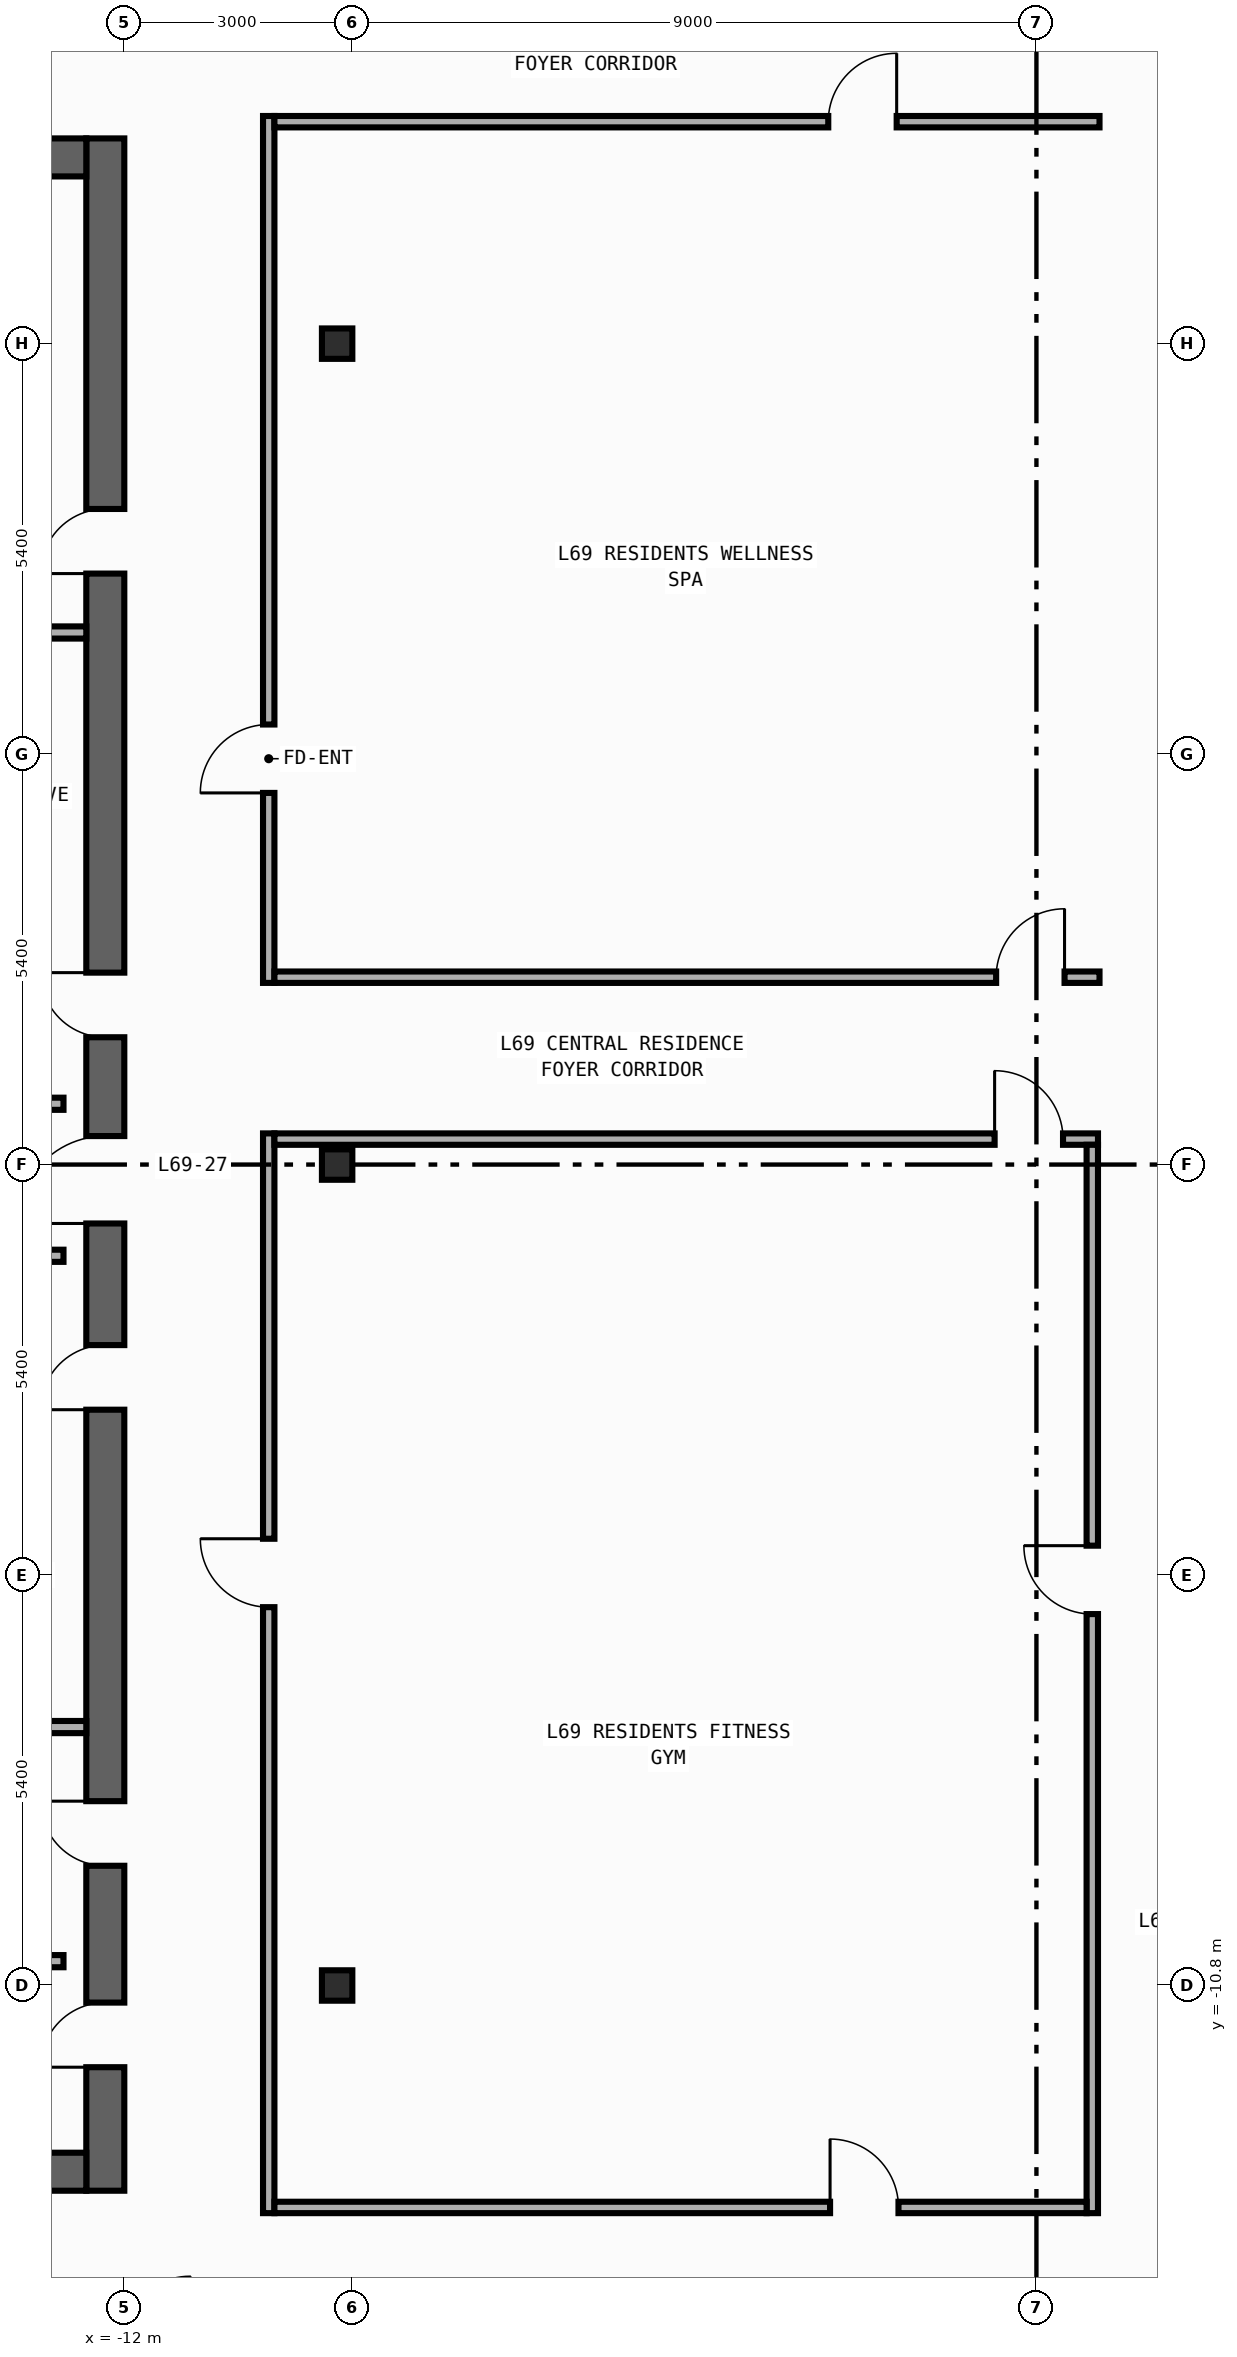
"""IFC4 building model, lengths in metres.
Left out: names, types, materials, properties, quantities, classifications, styles, units other than length and angle.
Written with IfcOpenShell. Run it as: python <this file> out.ifc"""

import sys

from ifc_helpers import new_model, si_unit, direction, frame, frame_2d, origin, origin_2d, place, context, subcontext, project, spatial, rectangle, i_section, extrude, element, fill, save


model = new_model("IFC4")
c1 = context("Model", 3, precision=1e-05, world=origin(), true_north=direction((0.0, 1.0)))
c2 = subcontext(c1, "Body", "Model", "MODEL_VIEW")
j1 = project(units=[si_unit("LENGTHUNIT", "METRE"), si_unit("PLANEANGLEUNIT", "RADIAN")], contexts=[c1])
p1 = place(None, origin())
s1 = spatial("IfcSite", under=j1, at=p1, CompositionType="ELEMENT")
p2 = place(p1, origin())
s2 = spatial("IfcBuilding", under=s1, at=p2, CompositionType="ELEMENT")
p3 = place(p2, frame((0.0, 0.0, 289.0)))
s3 = spatial("IfcBuildingStorey", under=s2, at=p3, CompositionType="ELEMENT", Elevation=289.0)
p4 = place(p3, frame((-12.25, -13.5, 0.0), z_axis=(0.0, 0.0, 1.0), x_axis=(0.0, 1.0, 0.0)))
e1 = element("IfcWall", 1, at=p4, inside=s3, PredefinedType="SHEAR", context=c2, shape_type="SweptSolid", body=[
    extrude(rectangle(XDim=27.0, YDim=0.5, at=frame_2d((13.5, 0.0))), origin(), (0.0, 0.0, 1.0), 3.54),
])
p5 = place(p4, frame((15.175, 0.0, 0.0)))
e2 = element("IfcOpeningElement", 2, at=p5, cuts=e1, PredefinedType="OPENING", context=c2, shape_type="SweptSolid", body=[
    extrude(rectangle(XDim=0.85, YDim=2.1, at=frame_2d((0.425, 1.05))), frame((0.0, 0.26, 0.0), z_axis=(0.0, -1.0, 0.0), x_axis=(1.0, 0.0, 0.0)), (0.0, 0.0, 1.0), 0.52),
])
p6 = place(p4, frame((21.275, 0.0, 0.0)))
e3 = element("IfcOpeningElement", 3, at=p6, cuts=e1, PredefinedType="OPENING", context=c2, shape_type="SweptSolid", body=[
    extrude(rectangle(XDim=0.85, YDim=2.1, at=frame_2d((0.425, 1.05))), frame((0.0, 0.26, 0.0), z_axis=(0.0, -1.0, 0.0), x_axis=(1.0, 0.0, 0.0)), (0.0, 0.0, 1.0), 0.52),
])
p7 = place(p4, frame((4.275, 0.0, 0.0)))
e4 = element("IfcOpeningElement", 4, at=p7, cuts=e1, PredefinedType="OPENING", context=c2, shape_type="SweptSolid", body=[
    extrude(rectangle(XDim=0.85, YDim=2.1, at=frame_2d((0.425, 1.05))), frame((0.0, 0.26, 0.0), z_axis=(0.0, -1.0, 0.0), x_axis=(1.0, 0.0, 0.0)), (0.0, 0.0, 1.0), 0.52),
])
p8 = place(p4, frame((10.275, 0.0, 0.0)))
e5 = element("IfcOpeningElement", 5, at=p8, cuts=e1, PredefinedType="OPENING", context=c2, shape_type="SweptSolid", body=[
    extrude(rectangle(XDim=0.85, YDim=2.1, at=frame_2d((0.425, 1.05))), frame((0.0, 0.26, 0.0), z_axis=(0.0, -1.0, 0.0), x_axis=(1.0, 0.0, 0.0)), (0.0, 0.0, 1.0), 0.52),
])
p9 = place(p4, frame((12.725, 0.0, 0.0)))
e6 = element("IfcOpeningElement", 6, at=p9, cuts=e1, PredefinedType="OPENING", context=c2, shape_type="SweptSolid", body=[
    extrude(rectangle(XDim=1.15, YDim=2.2, at=frame_2d((0.575, 1.1))), frame((0.0, 0.26, 0.0), z_axis=(0.0, -1.0, 0.0), x_axis=(1.0, 0.0, 0.0)), (0.0, 0.0, 1.0), 0.52),
])
p10 = place(p4, frame((1.625, 0.0, 0.0)))
e7 = element("IfcOpeningElement", 7, at=p10, cuts=e1, PredefinedType="OPENING", context=c2, shape_type="SweptSolid", body=[
    extrude(rectangle(XDim=0.85, YDim=2.1, at=frame_2d((0.425, 1.05))), frame((0.0, 0.26, 0.0), z_axis=(0.0, -1.0, 0.0), x_axis=(1.0, 0.0, 0.0)), (0.0, 0.0, 1.0), 0.52),
])
for number, where, z_axis, x_axis in (
    (8, (-19.9, -13.25, 0.0), (0.0, 0.0, 1.0), (1.0, 0.0, 0.0)),
    (9, (-19.9, 13.25, 0.0), (0.0, 0.0, 1.0), (1.0, 0.0, 0.0)),
):
    element("IfcWall", number, at=place(p3, frame(where, z_axis=z_axis, x_axis=x_axis)), inside=s3, PredefinedType="SHEAR", context=c2, shape_type="SweptSolid", body=[
        extrude(rectangle(XDim=7.4, YDim=0.5, at=frame_2d((3.7, 0.0))), origin(), (0.0, 0.0, 1.0), 3.54),
    ])
for number, where, z_axis, x_axis in (
    (10, (-9.2, -10.8, 0.0), (0.0, 0.0, 1.0), (1.0, 0.0, 0.0)),
    (11, (-9.2, 0.0, 0.0), (0.0, 0.0, 1.0), (1.0, 0.0, 0.0)),
    (12, (-9.2, 10.8, 0.0), (0.0, 0.0, 1.0), (1.0, 0.0, 0.0)),
):
    element("IfcColumn", number, at=place(p3, frame(where, z_axis=z_axis, x_axis=x_axis)), inside=s3, PredefinedType="COLUMN", context=c2, shape_type="SweptSolid", body=[
        extrude(i_section(OverallWidth=0.4, OverallDepth=0.4, WebThickness=0.013, FlangeThickness=0.021, FilletRadius=0.022, at=origin_2d()), origin(), (0.0, 0.0, 1.0), 3.8),
    ])
for number, where, z_axis, x_axis in (
    (13, (-15.4, 0.8, 0.0), (0.0, 0.0, 1.0), (1.0, 0.0, 0.0)),
    (14, (-15.4, -1.2, 0.0), (0.0, 0.0, 1.0), (1.0, 0.0, 0.0)),
    (15, (-15.4, -10.48, 0.0), (0.0, 0.0, 1.0), (1.0, 0.0, 0.0)),
):
    element("IfcWall", number, at=place(p3, frame(where, z_axis=z_axis, x_axis=x_axis)), inside=s3, PredefinedType="STANDARD", context=c2, shape_type="SweptSolid", body=[
        extrude(rectangle(XDim=2.6, YDim=0.16, at=frame_2d((1.3, 0.0))), origin(), (0.0, 0.0, 1.0), 3.54),
    ])
for number, where, z_axis, x_axis in (
    (16, (-15.4, 7.0, 0.0), (0.0, 0.0, 1.0), (1.0, 0.0, 0.0)),
    (17, (-15.4, -7.4, 0.0), (0.0, 0.0, 1.0), (1.0, 0.0, 0.0)),
):
    element("IfcWall", number, at=place(p3, frame(where, z_axis=z_axis, x_axis=x_axis)), inside=s3, PredefinedType="PARTITIONING", context=c2, shape_type="SweptSolid", body=[
        extrude(rectangle(XDim=2.9, YDim=0.16, at=frame_2d((1.45, 0.0))), origin(), (0.0, 0.0, 1.0), 3.54),
    ])
p11 = place(p3, frame((-10.1, 2.39, 0.0), z_axis=(0.0, 0.0, 1.0), x_axis=(0.0, 1.0, 0.0)))
e18 = element("IfcWall", 18, at=p11, inside=s3, PredefinedType="PARTITIONING", context=c2, shape_type="SweptSolid", body=[
    extrude(rectangle(XDim=11.405, YDim=0.15, at=frame_2d((5.703, 0.0))), origin(), (0.0, 0.0, 1.0), 3.54),
])
p12 = place(p11, frame((2.5, 0.0, 0.0)))
e19 = element("IfcOpeningElement", 19, at=p12, cuts=e18, PredefinedType="OPENING", context=c2, shape_type="SweptSolid", body=[
    extrude(rectangle(XDim=0.9, YDim=2.15, at=frame_2d((0.45, 1.075))), frame((0.0, 0.085, 0.0), z_axis=(0.0, -1.0, 0.0), x_axis=(1.0, 0.0, 0.0)), (0.0, 0.0, 1.0), 0.17),
])
p13 = place(p3, frame((-10.1, -13.795, 0.0), z_axis=(0.0, 0.0, 1.0), x_axis=(0.0, 1.0, 0.0)))
e20 = element("IfcWall", 20, at=p13, inside=s3, PredefinedType="PARTITIONING", context=c2, shape_type="SweptSolid", body=[
    extrude(rectangle(XDim=14.205, YDim=0.15, at=frame_2d((7.103, 0.0))), origin(), (0.0, 0.0, 1.0), 3.54),
])
p14 = place(p13, frame((7.972, 0.0, 0.0)))
e21 = element("IfcOpeningElement", 21, at=p14, cuts=e20, PredefinedType="OPENING", context=c2, shape_type="SweptSolid", body=[
    extrude(rectangle(XDim=0.9, YDim=2.15, at=frame_2d((0.45, 1.075))), frame((0.0, 0.085, 0.0), z_axis=(0.0, -1.0, 0.0), x_axis=(1.0, 0.0, 0.0)), (0.0, 0.0, 1.0), 0.17),
])
p15 = place(p3, frame((-10.025, 2.465, 0.0), z_axis=(0.0, 0.0, 1.0), x_axis=(1.0, 0.0, 0.0)))
e22 = element("IfcWall", 22, at=p15, inside=s3, PredefinedType="PARTITIONING", context=c2, shape_type="SweptSolid", body=[
    extrude(rectangle(XDim=10.855, YDim=0.15, at=frame_2d((5.427, 0.0))), origin(), (0.0, 0.0, 1.0), 3.54),
])
p16 = place(p15, frame((9.495, 0.0, 0.0)))
e23 = element("IfcOpeningElement", 23, at=p16, cuts=e22, PredefinedType="OPENING", context=c2, shape_type="SweptSolid", body=[
    extrude(rectangle(XDim=0.9, YDim=2.15, at=frame_2d((0.45, 1.075))), frame((0.0, 0.085, 0.0), z_axis=(0.0, -1.0, 0.0), x_axis=(1.0, 0.0, 0.0)), (0.0, 0.0, 1.0), 0.17),
])
p17 = place(p3, frame((-10.025, 0.335, 0.0), z_axis=(0.0, 0.0, 1.0), x_axis=(1.0, 0.0, 0.0)))
e24 = element("IfcWall", 24, at=p17, inside=s3, PredefinedType="PARTITIONING", context=c2, shape_type="SweptSolid", body=[
    extrude(rectangle(XDim=10.835, YDim=0.15, at=frame_2d((5.417, 0.0))), origin(), (0.0, 0.0, 1.0), 2.64),
])
p18 = place(p17, frame((9.475, 0.0, 0.0)))
e25 = element("IfcOpeningElement", 25, at=p18, cuts=e24, PredefinedType="OPENING", context=c2, shape_type="SweptSolid", body=[
    extrude(rectangle(XDim=0.9, YDim=2.15, at=frame_2d((0.45, 1.075))), frame((0.0, 0.085, 0.0), z_axis=(0.0, -1.0, 0.0), x_axis=(1.0, 0.0, 0.0)), (0.0, 0.0, 1.0), 0.17),
])
p19 = place(p3, frame((0.735, -13.795, 0.0), z_axis=(0.0, 0.0, 1.0), x_axis=(0.0, 1.0, 0.0)))
e26 = element("IfcWall", 26, at=p19, inside=s3, PredefinedType="PARTITIONING", context=c2, shape_type="SweptSolid", body=[
    extrude(rectangle(XDim=14.055, YDim=0.15, at=frame_2d((7.027, 0.0))), origin(), (0.0, 0.0, 1.0), 3.54),
])
p20 = place(p19, frame((7.881, 0.0, 0.0)))
e27 = element("IfcOpeningElement", 27, at=p20, cuts=e26, PredefinedType="OPENING", context=c2, shape_type="SweptSolid", body=[
    extrude(rectangle(XDim=0.9, YDim=2.15, at=frame_2d((0.45, 1.075))), frame((0.0, 0.085, 0.0), z_axis=(0.0, -1.0, 0.0), x_axis=(1.0, 0.0, 0.0)), (0.0, 0.0, 1.0), 0.17),
])
p21 = place(p3, frame((-10.025, 13.72, 0.0), z_axis=(0.0, 0.0, 1.0), x_axis=(1.0, 0.0, 0.0)))
e28 = element("IfcWall", 28, at=p21, inside=s3, PredefinedType="PARTITIONING", context=c2, shape_type="SweptSolid", body=[
    extrude(rectangle(XDim=10.855, YDim=0.15, at=frame_2d((5.427, 0.0))), origin(), (0.0, 0.0, 1.0), 3.54),
])
p22 = place(p21, frame((7.286, 0.0, 0.0)))
e29 = element("IfcOpeningElement", 29, at=p22, cuts=e28, PredefinedType="OPENING", context=c2, shape_type="SweptSolid", body=[
    extrude(rectangle(XDim=0.9, YDim=2.15, at=frame_2d((0.45, 1.075))), frame((0.0, 0.085, 0.0), z_axis=(0.0, -1.0, 0.0), x_axis=(1.0, 0.0, 0.0)), (0.0, 0.0, 1.0), 0.17),
])
p23 = place(p3, frame((-10.025, -13.72, 0.0), z_axis=(0.0, 0.0, 1.0), x_axis=(1.0, 0.0, 0.0)))
e30 = element("IfcWall", 30, at=p23, inside=s3, PredefinedType="PARTITIONING", context=c2, shape_type="SweptSolid", body=[
    extrude(rectangle(XDim=10.685, YDim=0.15, at=frame_2d((5.342, 0.0))), origin(), (0.0, 0.0, 1.0), 3.54),
])
p24 = place(p23, frame((7.31, 0.0, 0.0)))
e31 = element("IfcOpeningElement", 31, at=p24, cuts=e30, PredefinedType="OPENING", context=c2, shape_type="SweptSolid", body=[
    extrude(rectangle(XDim=0.9, YDim=2.15, at=frame_2d((0.45, 1.075))), frame((0.0, 0.085, 0.0), z_axis=(0.0, -1.0, 0.0), x_axis=(1.0, 0.0, 0.0)), (0.0, 0.0, 1.0), 0.17),
])
p25 = place(p5, origin())
e32 = element("IfcDoor", 32, at=p25, inside=s3, OperationType="SINGLE_SWING_RIGHT", PredefinedType="DOOR", context=c2, shape_type="SweptSolid", body=[
    extrude(rectangle(XDim=0.85, YDim=2.1, at=frame_2d((0.425, 1.05))), frame((0.0, 0.025, 0.0), z_axis=(0.0, -1.0, 0.0), x_axis=(1.0, 0.0, 0.0)), (0.0, 0.0, 1.0), 0.05),
])
fill(e2, e32)
p26 = place(p6, origin())
e33 = element("IfcDoor", 33, at=p26, inside=s3, OperationType="SINGLE_SWING_LEFT", PredefinedType="DOOR", context=c2, shape_type="SweptSolid", body=[
    extrude(rectangle(XDim=0.85, YDim=2.1, at=frame_2d((0.425, 1.05))), frame((0.0, 0.025, 0.0), z_axis=(0.0, -1.0, 0.0), x_axis=(1.0, 0.0, 0.0)), (0.0, 0.0, 1.0), 0.05),
])
fill(e3, e33)
p27 = place(p7, origin())
e34 = element("IfcDoor", 34, at=p27, inside=s3, OperationType="SINGLE_SWING_RIGHT", PredefinedType="DOOR", context=c2, shape_type="SweptSolid", body=[
    extrude(rectangle(XDim=0.85, YDim=2.1, at=frame_2d((0.425, 1.05))), frame((0.0, 0.025, 0.0), z_axis=(0.0, -1.0, 0.0), x_axis=(1.0, 0.0, 0.0)), (0.0, 0.0, 1.0), 0.05),
])
fill(e4, e34)
p28 = place(p8, origin())
e35 = element("IfcDoor", 35, at=p28, inside=s3, OperationType="SINGLE_SWING_LEFT", PredefinedType="DOOR", context=c2, shape_type="SweptSolid", body=[
    extrude(rectangle(XDim=0.85, YDim=2.1, at=frame_2d((0.425, 1.05))), frame((0.0, 0.025, 0.0), z_axis=(0.0, -1.0, 0.0), x_axis=(1.0, 0.0, 0.0)), (0.0, 0.0, 1.0), 0.05),
])
fill(e5, e35)
p29 = place(p9, origin())
e36 = element("IfcDoor", 36, at=p29, inside=s3, OperationType="SINGLE_SWING_LEFT", PredefinedType="DOOR", context=c2, shape_type="SweptSolid", body=[
    extrude(rectangle(XDim=1.15, YDim=2.2, at=frame_2d((0.575, 1.1))), frame((0.0, 0.025, 0.0), z_axis=(0.0, -1.0, 0.0), x_axis=(1.0, 0.0, 0.0)), (0.0, 0.0, 1.0), 0.05),
])
fill(e6, e36)
p30 = place(p10, origin())
e37 = element("IfcDoor", 37, at=p30, inside=s3, OperationType="SINGLE_SWING_LEFT", PredefinedType="DOOR", context=c2, shape_type="SweptSolid", body=[
    extrude(rectangle(XDim=0.85, YDim=2.1, at=frame_2d((0.425, 1.05))), frame((0.0, 0.025, 0.0), z_axis=(0.0, -1.0, 0.0), x_axis=(1.0, 0.0, 0.0)), (0.0, 0.0, 1.0), 0.05),
])
fill(e7, e37)
p31 = place(p12, origin())
e38 = element("IfcDoor", 38, at=p31, inside=s3, OperationType="SINGLE_SWING_LEFT", PredefinedType="DOOR", context=c2, shape_type="SweptSolid", body=[
    extrude(rectangle(XDim=0.9, YDim=2.15, at=frame_2d((0.45, 1.075))), frame((0.0, 0.025, 0.0), z_axis=(0.0, -1.0, 0.0), x_axis=(1.0, 0.0, 0.0)), (0.0, 0.0, 1.0), 0.05),
])
fill(e19, e38)
p32 = place(p14, origin())
e39 = element("IfcDoor", 39, at=p32, inside=s3, OperationType="SINGLE_SWING_RIGHT", PredefinedType="DOOR", context=c2, shape_type="SweptSolid", body=[
    extrude(rectangle(XDim=0.9, YDim=2.15, at=frame_2d((0.45, 1.075))), frame((0.0, 0.025, 0.0), z_axis=(0.0, -1.0, 0.0), x_axis=(1.0, 0.0, 0.0)), (0.0, 0.0, 1.0), 0.05),
])
fill(e21, e39)
p33 = place(p16, origin())
e40 = element("IfcDoor", 40, at=p33, inside=s3, OperationType="SINGLE_SWING_RIGHT", PredefinedType="DOOR", context=c2, shape_type="SweptSolid", body=[
    extrude(rectangle(XDim=0.9, YDim=2.15, at=frame_2d((0.45, 1.075))), frame((0.0, 0.025, 0.0), z_axis=(0.0, -1.0, 0.0), x_axis=(1.0, 0.0, 0.0)), (0.0, 0.0, 1.0), 0.05),
])
fill(e23, e40)
p34 = place(p18, origin())
e41 = element("IfcDoor", 41, at=p34, inside=s3, OperationType="SINGLE_SWING_LEFT", PredefinedType="DOOR", context=c2, shape_type="SweptSolid", body=[
    extrude(rectangle(XDim=0.9, YDim=2.15, at=frame_2d((0.45, 1.075))), frame((0.0, 0.025, 0.0), z_axis=(0.0, -1.0, 0.0), x_axis=(1.0, 0.0, 0.0)), (0.0, 0.0, 1.0), 0.05),
])
fill(e25, e41)
p35 = place(p20, origin())
e42 = element("IfcDoor", 42, at=p35, inside=s3, OperationType="SINGLE_SWING_RIGHT", PredefinedType="DOOR", context=c2, shape_type="SweptSolid", body=[
    extrude(rectangle(XDim=0.9, YDim=2.15, at=frame_2d((0.45, 1.075))), frame((0.0, 0.025, 0.0), z_axis=(0.0, -1.0, 0.0), x_axis=(1.0, 0.0, 0.0)), (0.0, 0.0, 1.0), 0.05),
])
fill(e27, e42)
p36 = place(p22, origin())
e43 = element("IfcDoor", 43, at=p36, inside=s3, OperationType="SINGLE_SWING_RIGHT", PredefinedType="DOOR", context=c2, shape_type="SweptSolid", body=[
    extrude(rectangle(XDim=0.9, YDim=2.15, at=frame_2d((0.45, 1.075))), frame((0.0, 0.025, 0.0), z_axis=(0.0, -1.0, 0.0), x_axis=(1.0, 0.0, 0.0)), (0.0, 0.0, 1.0), 0.05),
])
fill(e29, e43)
p37 = place(p24, origin())
e44 = element("IfcDoor", 44, at=p37, inside=s3, OperationType="SINGLE_SWING_LEFT", PredefinedType="DOOR", context=c2, shape_type="SweptSolid", body=[
    extrude(rectangle(XDim=0.9, YDim=2.15, at=frame_2d((0.45, 1.075))), frame((0.0, 0.025, 0.0), z_axis=(0.0, -1.0, 0.0), x_axis=(1.0, 0.0, 0.0)), (0.0, 0.0, 1.0), 0.05),
])
fill(e31, e44)
save(model, sys.argv[1])
